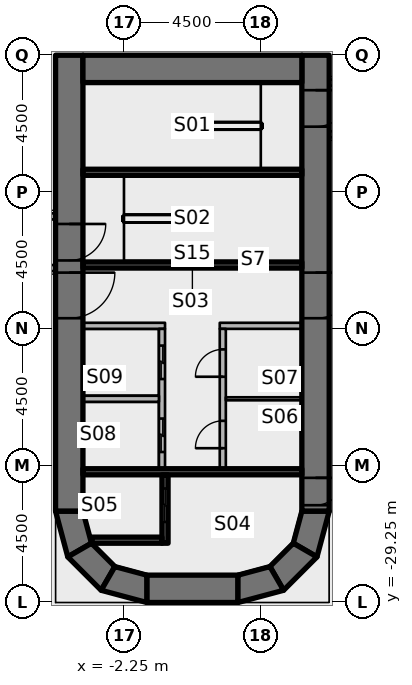
"""IFC4 building model, lengths in metres.
Left out: names, types, materials, properties, quantities, classifications, styles, units other than length and angle.
Written with IfcOpenShell. Run it as: python <this file> out.ifc"""

import sys

from ifc_helpers import new_model, si_unit, direction, frame, frame_2d, origin, place, context, subcontext, project, spatial, polyline, rectangle, outline, extrude, element, fill, save


model = new_model("IFC4")
c1 = context("Model", 3, precision=1e-05, world=origin(), true_north=direction((0.0, 1.0)))
c2 = subcontext(c1, "Body", "Model", "MODEL_VIEW")
j1 = project(units=[si_unit("LENGTHUNIT", "METRE"), si_unit("PLANEANGLEUNIT", "RADIAN")], contexts=[c1])
p1 = place(None, origin())
s1 = spatial("IfcSite", under=j1, at=p1, CompositionType="ELEMENT")
p2 = place(p1, origin())
s2 = spatial("IfcBuilding", under=s1, at=p2, CompositionType="ELEMENT")
p3 = place(p2, origin())
s3 = spatial("IfcBuildingStorey", under=s2, at=p3, CompositionType="ELEMENT", Elevation=0.0)
p4 = place(p3, frame((-4.05, -11.25, 0.0), z_axis=(0.0, 0.0, 1.0), x_axis=(0.0, -1.0, 0.0)))
e1 = element("IfcWall", 1, at=p4, inside=s3, PredefinedType="SHEAR", context=c2, shape_type="SweptSolid", body=[
    extrude(rectangle(XDim=15.0, YDim=0.9, at=frame_2d((7.5, 0.0))), origin(), (0.0, 0.0, 1.0), 7.0),
])
p5 = place(p4, frame((7.15, 0.0, 0.0)))
e2 = element("IfcOpeningElement", 2, at=p5, cuts=e1, PredefinedType="OPENING", context=c2, shape_type="SweptSolid", body=[
    extrude(rectangle(XDim=1.5, YDim=2.3, at=frame_2d((0.75, 1.15))), frame((0.0, 0.46, 0.0), z_axis=(0.0, -1.0, 0.0), x_axis=(1.0, 0.0, 0.0)), (0.0, 0.0, 1.0), 0.92),
])
p6 = place(p4, frame((5.55, 0.0, 0.0)))
e3 = element("IfcOpeningElement", 3, at=p6, cuts=e1, PredefinedType="OPENING", context=c2, shape_type="SweptSolid", body=[
    extrude(rectangle(XDim=1.2, YDim=2.1, at=frame_2d((0.6, 1.05))), frame((0.0, 0.46, 0.0), z_axis=(0.0, -1.0, 0.0), x_axis=(1.0, 0.0, 0.0)), (0.0, 0.0, 1.0), 0.92),
])
p7 = place(p3, frame((4.05, -11.25, 0.0), z_axis=(0.0, 0.0, 1.0), x_axis=(0.0, -1.0, 0.0)))
e4 = element("IfcWall", 4, at=p7, inside=s3, PredefinedType="SHEAR", context=c2, shape_type="SweptSolid", body=[
    extrude(rectangle(XDim=15.0, YDim=0.9, at=frame_2d((7.5, 0.0))), origin(), (0.0, 0.0, 1.0), 7.0),
])
p8 = place(p7, frame((7.15, 0.0, 0.0)))
e5 = element("IfcOpeningElement", 5, at=p8, cuts=e4, PredefinedType="OPENING", context=c2, shape_type="SweptSolid", body=[
    extrude(rectangle(XDim=1.5, YDim=2.3, at=frame_2d((0.75, 1.15))), frame((0.0, 0.46, 0.0), z_axis=(0.0, -1.0, 0.0), x_axis=(1.0, 0.0, 0.0)), (0.0, 0.0, 1.0), 0.92),
])
p9 = place(p7, frame((13.9, 0.0, 0.0)))
e6 = element("IfcOpeningElement", 6, at=p9, cuts=e4, PredefinedType="OPENING", context=c2, shape_type="SweptSolid", body=[
    extrude(rectangle(XDim=0.9, YDim=2.1, at=frame_2d((0.45, 1.05))), frame((0.0, 0.46, 0.0), z_axis=(0.0, -1.0, 0.0), x_axis=(1.0, 0.0, 0.0)), (0.0, 0.0, 1.0), 0.92),
])
p10 = place(p7, frame((1.15, 0.0, 0.0)))
e7 = element("IfcOpeningElement", 7, at=p10, cuts=e4, PredefinedType="OPENING", context=c2, shape_type="SweptSolid", body=[
    extrude(rectangle(XDim=1.2, YDim=2.1, at=frame_2d((0.6, 1.05))), frame((0.0, 0.46, 0.0), z_axis=(0.0, -1.0, 0.0), x_axis=(1.0, 0.0, 0.0)), (0.0, 0.0, 1.0), 0.92),
])
p11 = place(p3, frame((-3.6, -11.7, 0.0), z_axis=(0.0, 0.0, 1.0), x_axis=(1.0, 0.0, 0.0)))
e8 = element("IfcWall", 8, at=p11, inside=s3, PredefinedType="SHEAR", context=c2, shape_type="SweptSolid", body=[
    extrude(rectangle(XDim=7.2, YDim=0.9, at=frame_2d((3.6, 0.0))), origin(), (0.0, 0.0, 1.0), 7.0),
])
p12 = place(p3, frame((-1.5, -28.8, 0.0), z_axis=(0.0, 0.0, 1.0), x_axis=(1.0, 0.0, 0.0)))
e9 = element("IfcWall", 9, at=p12, inside=s3, PredefinedType="SHEAR", context=c2, shape_type="SweptSolid", body=[
    extrude(rectangle(XDim=3.0, YDim=0.9, at=frame_2d((1.5, 0.0))), origin(), (0.0, 0.0, 1.0), 7.0),
])
p13 = place(p3, origin())
e10 = element("IfcWall", 10, at=p13, inside=s3, PredefinedType="SHEAR", context=c2, shape_type="SweptSolid", body=[
    extrude(outline(polyline([(-4.5, -26.25), (-4.098, -27.75), (-3.319, -27.3), (-3.6, -26.25), (-4.5, -26.25)])), origin(), (0.0, 0.0, 1.0), 7.0),
])
p14 = place(p3, origin())
e11 = element("IfcWall", 11, at=p14, inside=s3, PredefinedType="SHEAR", context=c2, shape_type="SweptSolid", body=[
    extrude(outline(polyline([(-4.098, -27.75), (-3.0, -28.848), (-2.55, -28.069), (-3.319, -27.3), (-4.098, -27.75)])), origin(), (0.0, 0.0, 1.0), 7.0),
])
p15 = place(p3, origin())
e12 = element("IfcWall", 12, at=p15, inside=s3, PredefinedType="SHEAR", context=c2, shape_type="SweptSolid", body=[
    extrude(outline(polyline([(-3.0, -28.848), (-1.5, -29.25), (-1.5, -28.35), (-2.55, -28.069), (-3.0, -28.848)])), origin(), (0.0, 0.0, 1.0), 7.0),
])
p16 = place(p3, origin())
e13 = element("IfcWall", 13, at=p16, inside=s3, PredefinedType="SHEAR", context=c2, shape_type="SweptSolid", body=[
    extrude(outline(polyline([(4.5, -26.25), (4.098, -27.75), (3.319, -27.3), (3.6, -26.25), (4.5, -26.25)])), origin(), (0.0, 0.0, 1.0), 7.0),
])
p17 = place(p3, origin())
e14 = element("IfcWall", 14, at=p17, inside=s3, PredefinedType="SHEAR", context=c2, shape_type="SweptSolid", body=[
    extrude(outline(polyline([(4.098, -27.75), (3.0, -28.848), (2.55, -28.069), (3.319, -27.3), (4.098, -27.75)])), origin(), (0.0, 0.0, 1.0), 7.0),
])
p18 = place(p3, origin())
e15 = element("IfcWall", 15, at=p18, inside=s3, PredefinedType="SHEAR", context=c2, shape_type="SweptSolid", body=[
    extrude(outline(polyline([(3.0, -28.848), (1.5, -29.25), (1.5, -28.35), (2.55, -28.069), (3.0, -28.848)])), origin(), (0.0, 0.0, 1.0), 7.0),
])
p19 = place(p3, frame((3.6, -24.95, 0.0), z_axis=(0.0, 0.0, 1.0), x_axis=(-1.0, 0.0, 0.0)))
e16 = element("IfcWall", 16, at=p19, inside=s3, PredefinedType="SHEAR", context=c2, shape_type="SweptSolid", body=[
    extrude(rectangle(XDim=7.2, YDim=0.2, at=frame_2d((3.6, 0.0))), origin(), (0.0, 0.0, 1.0), 6.55),
])
p20 = place(p3, frame((-0.9, -27.3, 0.0), z_axis=(0.0, 0.0, 1.0), x_axis=(0.0, 1.0, 0.0)))
e17 = element("IfcWall", 17, at=p20, inside=s3, PredefinedType="SHEAR", context=c2, shape_type="SweptSolid", body=[
    extrude(rectangle(XDim=2.25, YDim=0.2, at=frame_2d((1.125, 0.0))), origin(), (0.0, 0.0, 1.0), 6.55),
])
p21 = place(p20, frame((0.7, 0.0, 0.0)))
e18 = element("IfcOpeningElement", 18, at=p21, cuts=e17, PredefinedType="OPENING", context=c2, shape_type="SweptSolid", body=[
    extrude(rectangle(XDim=1.1, YDim=2.3, at=frame_2d((0.55, 1.15))), frame((0.0, 0.11, 0.0), z_axis=(0.0, -1.0, 0.0), x_axis=(1.0, 0.0, 0.0)), (0.0, 0.0, 1.0), 0.22),
])
p22 = place(p3, origin())
e19 = element("IfcWall", 19, at=p22, inside=s3, PredefinedType="SHEAR", context=c2, shape_type="SweptSolid", body=[
    extrude(outline(polyline([(-1.0, -27.1), (-3.341, -27.1), (-3.291, -27.284), (-3.275, -27.3), (-1.0, -27.3), (-1.0, -27.1)])), origin(), (0.0, 0.0, 1.0), 6.55),
])
for number, where, z_axis, x_axis in (
    (20, (3.6, -18.15, 0.0), (0.0, 0.0, 1.0), (-1.0, 0.0, 0.0)),
    (21, (3.6, -15.1, 0.0), (0.0, 0.0, 1.0), (-1.0, 0.0, 0.0)),
):
    element("IfcWall", number, at=place(p3, frame(where, z_axis=z_axis, x_axis=x_axis)), inside=s3, PredefinedType="SHEAR", context=c2, shape_type="SweptSolid", body=[
        extrude(rectangle(XDim=7.2, YDim=0.2, at=frame_2d((3.6, 0.0))), origin(), (0.0, 0.0, 1.0), 6.55),
    ])
p23 = place(p3, frame((3.6, -20.15, 0.0), z_axis=(0.0, 0.0, 1.0), x_axis=(-1.0, 0.0, 0.0)))
e22 = element("IfcWall", 22, at=p23, inside=s3, PredefinedType="PARTITIONING", context=c2, shape_type="SweptSolid", body=[
    extrude(rectangle(XDim=2.7, YDim=0.2, at=frame_2d((1.35, 0.0))), origin(), (0.0, 0.0, 1.0), 6.55),
])
p24 = place(p3, frame((1.0, -24.85, 0.0), z_axis=(0.0, 0.0, 1.0), x_axis=(0.0, 1.0, 0.0)))
e23 = element("IfcWall", 23, at=p24, inside=s3, PredefinedType="PARTITIONING", context=c2, shape_type="SweptSolid", body=[
    extrude(rectangle(XDim=4.6, YDim=0.2, at=frame_2d((2.3, 0.0))), origin(), (0.0, 0.0, 1.0), 6.55),
])
p25 = place(p24, frame((0.675, 0.0, 0.0)))
e24 = element("IfcOpeningElement", 24, at=p25, cuts=e23, PredefinedType="OPENING", context=c2, shape_type="SweptSolid", body=[
    extrude(rectangle(XDim=0.9, YDim=2.1, at=frame_2d((0.45, 1.05))), frame((0.0, 0.11, 0.0), z_axis=(0.0, -1.0, 0.0), x_axis=(1.0, 0.0, 0.0)), (0.0, 0.0, 1.0), 0.22),
])
p26 = place(p24, frame((3.025, 0.0, 0.0)))
e25 = element("IfcOpeningElement", 25, at=p26, cuts=e23, PredefinedType="OPENING", context=c2, shape_type="SweptSolid", body=[
    extrude(rectangle(XDim=0.9, YDim=2.1, at=frame_2d((0.45, 1.05))), frame((0.0, 0.11, 0.0), z_axis=(0.0, -1.0, 0.0), x_axis=(1.0, 0.0, 0.0)), (0.0, 0.0, 1.0), 0.22),
])
p27 = place(p3, frame((-0.9, -20.15, 0.0), z_axis=(0.0, 0.0, 1.0), x_axis=(-1.0, 0.0, 0.0)))
e26 = element("IfcWall", 26, at=p27, inside=s3, PredefinedType="PARTITIONING", context=c2, shape_type="SweptSolid", body=[
    extrude(rectangle(XDim=2.7, YDim=0.2, at=frame_2d((1.35, 0.0))), origin(), (0.0, 0.0, 1.0), 6.55),
])
p28 = place(p3, frame((-1.0, -24.85, 0.0), z_axis=(0.0, 0.0, 1.0), x_axis=(0.0, 1.0, 0.0)))
e27 = element("IfcWall", 27, at=p28, inside=s3, PredefinedType="PARTITIONING", context=c2, shape_type="SweptSolid", body=[
    extrude(rectangle(XDim=4.6, YDim=0.2, at=frame_2d((2.3, 0.0))), origin(), (0.0, 0.0, 1.0), 6.55),
])
p29 = place(p28, frame((0.55, 0.0, 0.0)))
e28 = element("IfcOpeningElement", 28, at=p29, cuts=e27, PredefinedType="OPENING", context=c2, shape_type="SweptSolid", body=[
    extrude(rectangle(XDim=1.1, YDim=2.3, at=frame_2d((0.55, 1.15))), frame((0.0, 0.11, 0.0), z_axis=(0.0, -1.0, 0.0), x_axis=(1.0, 0.0, 0.0)), (0.0, 0.0, 1.0), 0.22),
])
p30 = place(p28, frame((2.95, 0.0, 0.0)))
e29 = element("IfcOpeningElement", 29, at=p30, cuts=e27, PredefinedType="OPENING", context=c2, shape_type="SweptSolid", body=[
    extrude(rectangle(XDim=1.1, YDim=2.3, at=frame_2d((0.55, 1.15))), frame((0.0, 0.11, 0.0), z_axis=(0.0, -1.0, 0.0), x_axis=(1.0, 0.0, 0.0)), (0.0, 0.0, 1.0), 0.22),
])
p31 = place(p3, frame((3.6, -22.55, 0.0), z_axis=(0.0, 0.0, 1.0), x_axis=(-1.0, 0.0, 0.0)))
e30 = element("IfcWall", 30, at=p31, inside=s3, PredefinedType="PARTITIONING", context=c2, shape_type="SweptSolid", body=[
    extrude(rectangle(XDim=2.5, YDim=0.1, at=frame_2d((1.25, 0.0))), origin(), (0.0, 0.0, 1.0), 6.55),
])
p32 = place(p3, frame((-1.1, -22.55, 0.0), z_axis=(0.0, 0.0, 1.0), x_axis=(-1.0, 0.0, 0.0)))
e31 = element("IfcWall", 31, at=p32, inside=s3, PredefinedType="PARTITIONING", context=c2, shape_type="SweptSolid", body=[
    extrude(rectangle(XDim=2.5, YDim=0.2, at=frame_2d((1.25, 0.0))), origin(), (0.0, 0.0, 1.0), 6.55),
])
for number, where, z_axis, x_axis in (
    (32, (-4.5, -18.25, 0.0), (0.0, 0.0, 1.0), (-1.0, 0.0, 0.0)),
    (33, (-4.5, -16.55, 0.0), (0.0, 0.0, 1.0), (-1.0, 0.0, 0.0)),
    (34, (4.5, -12.15, 0.0), (0.0, 0.0, 1.0), (1.0, 0.0, 0.0)),
    (35, (4.5, -13.85, 0.0), (0.0, 0.0, 1.0), (1.0, 0.0, 0.0)),
):
    element("IfcWall", number, at=place(p3, frame(where, z_axis=z_axis, x_axis=x_axis)), inside=s3, PredefinedType="PARTITIONING", context=c2, shape_type="SweptSolid", body=[
        extrude(rectangle(XDim=51.55, YDim=0.2, at=frame_2d((25.775, 0.0))), origin(), (0.0, 0.0, 1.0), 6.55),
    ])
p33 = place(p8, origin())
e36 = element("IfcDoor", 36, at=p33, inside=s3, OperationType="DOUBLE_DOOR_SINGLE_SWING", PredefinedType="DOOR", context=c2, shape_type="SweptSolid", body=[
    extrude(rectangle(XDim=1.5, YDim=2.3, at=frame_2d((0.75, 1.15))), frame((0.0, 0.025, 0.0), z_axis=(0.0, -1.0, 0.0), x_axis=(1.0, 0.0, 0.0)), (0.0, 0.0, 1.0), 0.05),
])
fill(e5, e36)
p34 = place(p5, origin())
e37 = element("IfcDoor", 37, at=p34, inside=s3, OperationType="DOUBLE_DOOR_SINGLE_SWING", PredefinedType="DOOR", context=c2, shape_type="SweptSolid", body=[
    extrude(rectangle(XDim=1.5, YDim=2.3, at=frame_2d((0.75, 1.15))), frame((0.0, 0.025, 0.0), z_axis=(0.0, -1.0, 0.0), x_axis=(1.0, 0.0, 0.0)), (0.0, 0.0, 1.0), 0.05),
])
fill(e2, e37)
p35 = place(p9, origin())
e38 = element("IfcDoor", 38, at=p35, inside=s3, OperationType="SINGLE_SWING_LEFT", PredefinedType="DOOR", context=c2, shape_type="SweptSolid", body=[
    extrude(rectangle(XDim=0.9, YDim=2.1, at=frame_2d((0.45, 1.05))), frame((0.0, 0.025, 0.0), z_axis=(0.0, -1.0, 0.0), x_axis=(1.0, 0.0, 0.0)), (0.0, 0.0, 1.0), 0.05),
])
fill(e6, e38)
p36 = place(p6, origin())
e39 = element("IfcDoor", 39, at=p36, inside=s3, OperationType="SINGLE_SWING_LEFT", PredefinedType="DOOR", context=c2, shape_type="SweptSolid", body=[
    extrude(rectangle(XDim=1.2, YDim=2.1, at=frame_2d((0.6, 1.05))), frame((0.0, 0.025, 0.0), z_axis=(0.0, -1.0, 0.0), x_axis=(1.0, 0.0, 0.0)), (0.0, 0.0, 1.0), 0.05),
])
fill(e3, e39)
p37 = place(p10, origin())
e40 = element("IfcDoor", 40, at=p37, inside=s3, OperationType="SINGLE_SWING_RIGHT", PredefinedType="DOOR", context=c2, shape_type="SweptSolid", body=[
    extrude(rectangle(XDim=1.2, YDim=2.1, at=frame_2d((0.6, 1.05))), frame((0.0, 0.025, 0.0), z_axis=(0.0, -1.0, 0.0), x_axis=(1.0, 0.0, 0.0)), (0.0, 0.0, 1.0), 0.05),
])
fill(e7, e40)
p38 = place(p21, origin())
e41 = element("IfcDoor", 41, at=p38, inside=s3, OperationType="DOUBLE_DOOR_SLIDING", PredefinedType="DOOR", context=c2, shape_type="SweptSolid", body=[
    extrude(rectangle(XDim=1.1, YDim=2.3, at=frame_2d((0.55, 1.15))), frame((0.0, 0.025, 0.0), z_axis=(0.0, -1.0, 0.0), x_axis=(1.0, 0.0, 0.0)), (0.0, 0.0, 1.0), 0.05),
])
fill(e18, e41)
p39 = place(p25, origin())
e42 = element("IfcDoor", 42, at=p39, inside=s3, OperationType="SINGLE_SWING_RIGHT", PredefinedType="DOOR", context=c2, shape_type="SweptSolid", body=[
    extrude(rectangle(XDim=0.9, YDim=2.1, at=frame_2d((0.45, 1.05))), frame((0.0, 0.025, 0.0), z_axis=(0.0, -1.0, 0.0), x_axis=(1.0, 0.0, 0.0)), (0.0, 0.0, 1.0), 0.05),
])
fill(e24, e42)
p40 = place(p26, origin())
e43 = element("IfcDoor", 43, at=p40, inside=s3, OperationType="SINGLE_SWING_RIGHT", PredefinedType="DOOR", context=c2, shape_type="SweptSolid", body=[
    extrude(rectangle(XDim=0.9, YDim=2.1, at=frame_2d((0.45, 1.05))), frame((0.0, 0.025, 0.0), z_axis=(0.0, -1.0, 0.0), x_axis=(1.0, 0.0, 0.0)), (0.0, 0.0, 1.0), 0.05),
])
fill(e25, e43)
p41 = place(p29, origin())
e44 = element("IfcDoor", 44, at=p41, inside=s3, OperationType="DOUBLE_DOOR_SLIDING", PredefinedType="DOOR", context=c2, shape_type="SweptSolid", body=[
    extrude(rectangle(XDim=1.1, YDim=2.3, at=frame_2d((0.55, 1.15))), frame((0.0, 0.025, 0.0), z_axis=(0.0, -1.0, 0.0), x_axis=(1.0, 0.0, 0.0)), (0.0, 0.0, 1.0), 0.05),
])
fill(e28, e44)
p42 = place(p30, origin())
e45 = element("IfcDoor", 45, at=p42, inside=s3, OperationType="DOUBLE_DOOR_SLIDING", PredefinedType="DOOR", context=c2, shape_type="SweptSolid", body=[
    extrude(rectangle(XDim=1.1, YDim=2.3, at=frame_2d((0.55, 1.15))), frame((0.0, 0.025, 0.0), z_axis=(0.0, -1.0, 0.0), x_axis=(1.0, 0.0, 0.0)), (0.0, 0.0, 1.0), 0.05),
])
fill(e29, e45)
save(model, sys.argv[1])
